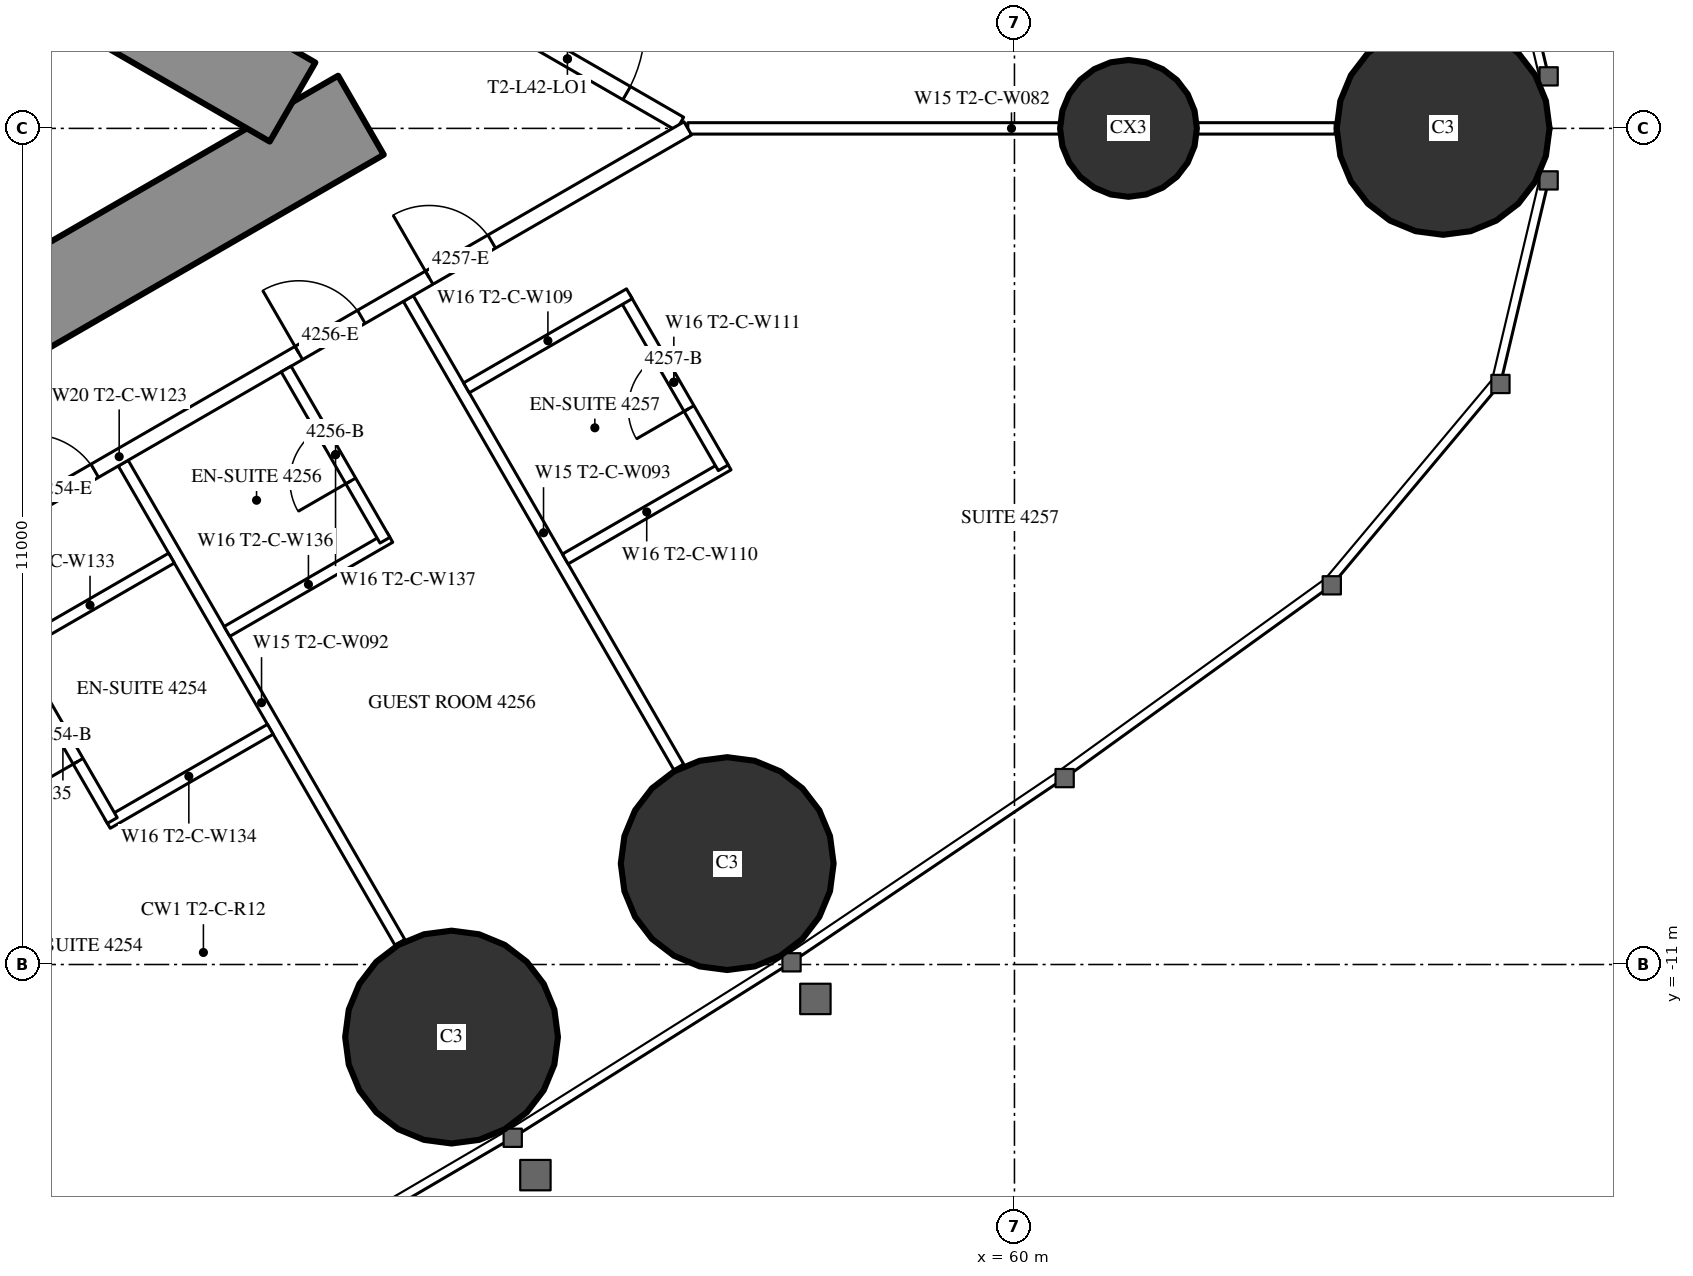
"""IFC4 building model, lengths in metres.
Left out: names, types, materials, properties, quantities, classifications, styles, units other than length and angle.
Written with IfcOpenShell. Run it as: python <this file> out.ifc"""

import sys

from ifc_helpers import new_model, si_unit, direction, frame, frame_2d, origin, origin_2d, place, context, subcontext, project, spatial, rectangle, circle, extrude, element, fill, save


model = new_model("IFC4")
c1 = context("Model", 3, precision=1e-05, world=origin(), true_north=direction((0.0, 1.0)))
c2 = subcontext(c1, "Body", "Model", "MODEL_VIEW")
j1 = project(units=[si_unit("LENGTHUNIT", "METRE"), si_unit("PLANEANGLEUNIT", "RADIAN")], contexts=[c1])
p1 = place(None, origin())
s1 = spatial("IfcSite", under=j1, at=p1, CompositionType="ELEMENT")
p2 = place(p1, origin())
s2 = spatial("IfcBuilding", under=s1, at=p2, CompositionType="ELEMENT")
p3 = place(p2, frame((0.0, 0.0, 159.8)))
s3 = spatial("IfcBuildingStorey", under=s2, at=p3, CompositionType="ELEMENT", Elevation=159.8)
for number, where, z_axis, x_axis in (
    (1, (65.64, 0.0, 0.0), (0.0, 0.0, 1.0), (1.0, 0.0, 0.0)),
    (2, (52.594, -11.955, 0.0), (0.0, 0.0, 1.0), (1.0, 0.0, 0.0)),
    (3, (56.221, -9.672, 0.0), (0.0, 0.0, 1.0), (1.0, 0.0, 0.0)),
):
    element("IfcColumn", number, at=place(p3, frame(where, z_axis=z_axis, x_axis=x_axis)), inside=s3, PredefinedType="COLUMN", context=c2, shape_type="SweptSolid", body=[
        extrude(circle(Radius=1.4, at=origin_2d()), origin(), (0.0, 0.0, 1.0), 3.5),
    ])
p4 = place(p3, frame((61.5, 0.0, 0.0), z_axis=(0.0, 0.0, 1.0), x_axis=(1.0, 0.0, 0.0)))
e4 = element("IfcColumn", 4, at=p4, inside=s3, PredefinedType="COLUMN", context=c2, shape_type="SweptSolid", body=[
    extrude(circle(Radius=0.9, at=origin_2d()), origin(), (0.0, 0.0, 1.0), 3.5),
])
p5 = place(p3, frame((27.2, -13.8, 0.0), z_axis=(0.0, 0.0, 1.0), x_axis=(0.866027159892, 0.499996958321, 0.0)))
e5 = element("IfcWall", 5, at=p5, inside=s3, PredefinedType="SHEAR", context=c2, shape_type="SweptSolid", body=[
    extrude(rectangle(XDim=27.947, YDim=1.2, at=frame_2d((13.973, 0.0))), origin(), (0.0, 0.0, 1.0), 3.5),
])
p6 = place(p5, frame((4.6, 0.0, 0.0)))
e6 = element("IfcOpeningElement", 6, at=p6, cuts=e5, PredefinedType="OPENING", context=c2, shape_type="SweptSolid", body=[
    extrude(rectangle(XDim=1.0, YDim=2.2, at=frame_2d((0.5, 1.1))), frame((0.0, 0.61, 0.0), z_axis=(0.0, -1.0, 0.0), x_axis=(1.0, 0.0, 0.0)), (0.0, 0.0, 1.0), 1.22),
])
p7 = place(p5, frame((13.395, 0.0, 0.0)))
e7 = element("IfcOpeningElement", 7, at=p7, cuts=e5, PredefinedType="OPENING", context=c2, shape_type="SweptSolid", body=[
    extrude(rectangle(XDim=1.8, YDim=2.2, at=frame_2d((0.9, 1.1))), frame((0.0, 0.61, 0.0), z_axis=(0.0, -1.0, 0.0), x_axis=(1.0, 0.0, 0.0)), (0.0, 0.0, 1.0), 1.22),
])
p8 = place(p3, frame((27.2, 13.8, 0.0), z_axis=(0.0, 0.0, 1.0), x_axis=(0.866024515034, -0.500001539357, 0.0)))
e8 = element("IfcWall", 8, at=p8, inside=s3, PredefinedType="SHEAR", context=c2, shape_type="SweptSolid", body=[
    extrude(rectangle(XDim=26.907, YDim=1.2, at=frame_2d((13.454, 0.0))), origin(), (0.0, 0.0, 1.0), 3.5),
])
p9 = place(p8, frame((4.6, 0.0, 0.0)))
e9 = element("IfcOpeningElement", 9, at=p9, cuts=e8, PredefinedType="OPENING", context=c2, shape_type="SweptSolid", body=[
    extrude(rectangle(XDim=1.0, YDim=2.2, at=frame_2d((0.5, 1.1))), frame((0.0, 0.61, 0.0), z_axis=(0.0, -1.0, 0.0), x_axis=(1.0, 0.0, 0.0)), (0.0, 0.0, 1.0), 1.22),
])
p10 = place(p8, frame((13.395, 0.0, 0.0)))
e10 = element("IfcOpeningElement", 10, at=p10, cuts=e8, PredefinedType="OPENING", context=c2, shape_type="SweptSolid", body=[
    extrude(rectangle(XDim=1.8, YDim=2.2, at=frame_2d((0.9, 1.1))), frame((0.0, 0.61, 0.0), z_axis=(0.0, -1.0, 0.0), x_axis=(1.0, 0.0, 0.0)), (0.0, 0.0, 1.0), 1.22),
])
p11 = place(p3, frame((48.275, -4.404, 0.0), z_axis=(0.0, 0.0, 1.0), x_axis=(0.500006004368, -0.866021937133, 0.0)))
e11 = element("IfcWall", 11, at=p11, inside=s3, PredefinedType="PARTITIONING", context=c2, shape_type="SweptSolid", body=[
    extrude(rectangle(XDim=7.279, YDim=0.15, at=frame_2d((3.64, 0.0))), origin(), (0.0, 0.0, 1.0), 2.3),
])
p12 = place(p3, frame((52.025, -2.238, 0.0), z_axis=(0.0, 0.0, 1.0), x_axis=(0.499983785035, -0.866034765296, 0.0)))
e12 = element("IfcWall", 12, at=p12, inside=s3, PredefinedType="PARTITIONING", context=c2, shape_type="SweptSolid", body=[
    extrude(rectangle(XDim=7.116, YDim=0.15, at=frame_2d((3.558, 0.0))), origin(), (0.0, 0.0, 1.0), 2.3),
])
p13 = place(p3, frame((55.702, 0.0, 0.0), z_axis=(0.0, 0.0, 1.0), x_axis=(1.0, 0.0, 0.0)))
e13 = element("IfcWall", 13, at=p13, inside=s3, PredefinedType="PARTITIONING", context=c2, shape_type="SweptSolid", body=[
    extrude(rectangle(XDim=8.518, YDim=0.15, at=frame_2d((4.259, 0.0))), origin(), (0.0, 0.0, 1.0), 2.3),
])
p14 = place(p3, frame((52.639, 1.769, 0.0), z_axis=(0.0, 0.0, 1.0), x_axis=(0.866027340901, -0.4999966448, 0.0)))
e14 = element("IfcWall", 14, at=p14, inside=s3, PredefinedType="PARTITIONING", context=c2, shape_type="SweptSolid", body=[
    extrude(rectangle(XDim=3.417, YDim=0.2, at=frame_2d((1.708, 0.0))), origin(), (0.0, 0.0, 1.0), 3.25),
])
p15 = place(p14, frame((0.809, 0.0, 0.0)))
e15 = element("IfcOpeningElement", 15, at=p15, cuts=e14, PredefinedType="OPENING", context=c2, shape_type="SweptSolid", body=[
    extrude(rectangle(XDim=1.8, YDim=2.2, at=frame_2d((0.9, 1.1))), frame((0.0, 0.11, 0.0), z_axis=(0.0, -1.0, 0.0), x_axis=(1.0, 0.0, 0.0)), (0.0, 0.0, 1.0), 0.22),
])
p16 = place(p3, frame((40.741, -8.638, 0.0), z_axis=(0.0, 0.0, 1.0), x_axis=(0.866022967338, 0.500004220025, 0.0)))
e16 = element("IfcWall", 16, at=p16, inside=s3, PredefinedType="PARTITIONING", context=c2, shape_type="SweptSolid", body=[
    extrude(rectangle(XDim=17.276, YDim=0.2, at=frame_2d((8.638, 0.0))), origin(), (0.0, 0.0, 1.0), 3.25),
])
p17 = place(p16, frame((7.316, 0.0, 0.0)))
e17 = element("IfcOpeningElement", 17, at=p17, cuts=e16, PredefinedType="OPENING", context=c2, shape_type="SweptSolid", body=[
    extrude(rectangle(XDim=0.95, YDim=2.2, at=frame_2d((0.475, 1.1))), frame((0.0, 0.11, 0.0), z_axis=(0.0, -1.0, 0.0), x_axis=(1.0, 0.0, 0.0)), (0.0, 0.0, 1.0), 0.22),
])
p18 = place(p16, frame((11.366, 0.0, 0.0)))
e18 = element("IfcOpeningElement", 18, at=p18, cuts=e16, PredefinedType="OPENING", context=c2, shape_type="SweptSolid", body=[
    extrude(rectangle(XDim=0.95, YDim=2.2, at=frame_2d((0.475, 1.1))), frame((0.0, 0.11, 0.0), z_axis=(0.0, -1.0, 0.0), x_axis=(1.0, 0.0, 0.0)), (0.0, 0.0, 1.0), 0.22),
])
p19 = place(p16, frame((13.347, 0.0, 0.0)))
e19 = element("IfcOpeningElement", 19, at=p19, cuts=e16, PredefinedType="OPENING", context=c2, shape_type="SweptSolid", body=[
    extrude(rectangle(XDim=0.95, YDim=2.2, at=frame_2d((0.475, 1.1))), frame((0.0, 0.11, 0.0), z_axis=(0.0, -1.0, 0.0), x_axis=(1.0, 0.0, 0.0)), (0.0, 0.0, 1.0), 0.22),
])
p20 = place(p3, frame((48.066, -9.143, 0.0), z_axis=(0.0, 0.0, 1.0), x_axis=(0.866006523861, 0.500032699561, 0.0)))
e20 = element("IfcWall", 20, at=p20, inside=s3, PredefinedType="PARTITIONING", context=c2, shape_type="SweptSolid", body=[
    extrude(rectangle(XDim=2.475, YDim=0.15, at=frame_2d((1.237, 0.0))), origin(), (0.0, 0.0, 1.0), 3.25),
])
p21 = place(p3, frame((46.831, -6.854, 0.0), z_axis=(0.0, 0.0, 1.0), x_axis=(0.500006934395, -0.866021400173, 0.0)))
e21 = element("IfcWall", 21, at=p21, inside=s3, PredefinedType="PARTITIONING", context=c2, shape_type="SweptSolid", body=[
    extrude(rectangle(XDim=2.6, YDim=0.15, at=frame_2d((1.3, 0.0))), origin(), (0.0, 0.0, 1.0), 3.25),
])
p22 = place(p21, frame((0.9, 0.0, 0.0)))
e22 = element("IfcOpeningElement", 22, at=p22, cuts=e21, PredefinedType="OPENING", context=c2, shape_type="SweptSolid", body=[
    extrude(rectangle(XDim=0.8, YDim=2.2, at=frame_2d((0.4, 1.1))), frame((0.0, 0.085, 0.0), z_axis=(0.0, -1.0, 0.0), x_axis=(1.0, 0.0, 0.0)), (0.0, 0.0, 1.0), 0.17),
])
for number, where, z_axis, x_axis in (
    (23, (46.766, -6.891, 0.0), (0.0, 0.0, 1.0), (0.866, 0.5, 0.0)),
    (24, (49.64, -6.618, 0.0), (0.0, 0.0, 1.0), (0.866, 0.5, 0.0)),
):
    element("IfcWall", number, at=place(p3, frame(where, z_axis=z_axis, x_axis=x_axis)), inside=s3, PredefinedType="PARTITIONING", context=c2, shape_type="SweptSolid", body=[
        extrude(rectangle(XDim=2.475, YDim=0.15, at=frame_2d((1.237, 0.0))), origin(), (0.0, 0.0, 1.0), 3.25),
    ])
p23 = place(p3, frame((50.418, -3.166, 0.0), z_axis=(0.0, 0.0, 1.0), x_axis=(0.499936506574, -0.866062058628, 0.0)))
e25 = element("IfcWall", 25, at=p23, inside=s3, PredefinedType="PARTITIONING", context=c2, shape_type="SweptSolid", body=[
    extrude(rectangle(XDim=2.6, YDim=0.15, at=frame_2d((1.3, 0.0))), origin(), (0.0, 0.0, 1.0), 3.25),
])
p24 = place(p23, frame((0.9, 0.0, 0.0)))
e26 = element("IfcOpeningElement", 26, at=p24, cuts=e25, PredefinedType="OPENING", context=c2, shape_type="SweptSolid", body=[
    extrude(rectangle(XDim=0.8, YDim=2.2, at=frame_2d((0.4, 1.1))), frame((0.0, 0.085, 0.0), z_axis=(0.0, -1.0, 0.0), x_axis=(1.0, 0.0, 0.0)), (0.0, 0.0, 1.0), 0.17),
])
p25 = place(p3, frame((54.09, -5.665, 0.0), z_axis=(0.0, 0.0, 1.0), x_axis=(0.866006523861, 0.500032699561, 0.0)))
e27 = element("IfcWall", 27, at=p25, inside=s3, PredefinedType="PARTITIONING", context=c2, shape_type="SweptSolid", body=[
    extrude(rectangle(XDim=2.475, YDim=0.15, at=frame_2d((1.237, 0.0))), origin(), (0.0, 0.0, 1.0), 3.25),
])
p26 = place(p3, frame((54.869, -2.213, 0.0), z_axis=(0.0, 0.0, 1.0), x_axis=(0.500047596559, -0.865997922154, 0.0)))
e28 = element("IfcWall", 28, at=p26, inside=s3, PredefinedType="PARTITIONING", context=c2, shape_type="SweptSolid", body=[
    extrude(rectangle(XDim=2.6, YDim=0.15, at=frame_2d((1.3, 0.0))), origin(), (0.0, 0.0, 1.0), 3.25),
])
p27 = place(p26, frame((0.9, 0.0, 0.0)))
e29 = element("IfcOpeningElement", 29, at=p27, cuts=e28, PredefinedType="OPENING", context=c2, shape_type="SweptSolid", body=[
    extrude(rectangle(XDim=0.8, YDim=2.2, at=frame_2d((0.4, 1.1))), frame((0.0, 0.085, 0.0), z_axis=(0.0, -1.0, 0.0), x_axis=(1.0, 0.0, 0.0)), (0.0, 0.0, 1.0), 0.17),
])
p28 = place(p3, frame((52.79, -3.413, 0.0), z_axis=(0.0, 0.0, 1.0), x_axis=(0.866006523861, 0.500032699561, 0.0)))
e30 = element("IfcWall", 30, at=p28, inside=s3, PredefinedType="PARTITIONING", context=c2, shape_type="SweptSolid", body=[
    extrude(rectangle(XDim=2.475, YDim=0.15, at=frame_2d((1.237, 0.0))), origin(), (0.0, 0.0, 1.0), 3.25),
])
p29 = place(p22, origin())
e31 = element("IfcDoor", 31, at=p29, inside=s3, OperationType="SINGLE_SWING_RIGHT", PredefinedType="DOOR", context=c2, shape_type="SweptSolid", body=[
    extrude(rectangle(XDim=0.8, YDim=2.2, at=frame_2d((0.4, 1.1))), frame((0.0, 0.025, 0.0), z_axis=(0.0, -1.0, 0.0), x_axis=(1.0, 0.0, 0.0)), (0.0, 0.0, 1.0), 0.05),
])
fill(e22, e31)
p30 = place(p17, origin())
e32 = element("IfcDoor", 32, at=p30, inside=s3, OperationType="SINGLE_SWING_LEFT", PredefinedType="DOOR", context=c2, shape_type="SweptSolid", body=[
    extrude(rectangle(XDim=0.95, YDim=2.2, at=frame_2d((0.475, 1.1))), frame((0.0, 0.025, 0.0), z_axis=(0.0, -1.0, 0.0), x_axis=(1.0, 0.0, 0.0)), (0.0, 0.0, 1.0), 0.05),
])
fill(e17, e32)
p31 = place(p24, origin())
e33 = element("IfcDoor", 33, at=p31, inside=s3, OperationType="SINGLE_SWING_RIGHT", PredefinedType="DOOR", context=c2, shape_type="SweptSolid", body=[
    extrude(rectangle(XDim=0.8, YDim=2.2, at=frame_2d((0.4, 1.1))), frame((0.0, 0.025, 0.0), z_axis=(0.0, -1.0, 0.0), x_axis=(1.0, 0.0, 0.0)), (0.0, 0.0, 1.0), 0.05),
])
fill(e26, e33)
p32 = place(p18, origin())
e34 = element("IfcDoor", 34, at=p32, inside=s3, OperationType="SINGLE_SWING_LEFT", PredefinedType="DOOR", context=c2, shape_type="SweptSolid", body=[
    extrude(rectangle(XDim=0.95, YDim=2.2, at=frame_2d((0.475, 1.1))), frame((0.0, 0.025, 0.0), z_axis=(0.0, -1.0, 0.0), x_axis=(1.0, 0.0, 0.0)), (0.0, 0.0, 1.0), 0.05),
])
fill(e18, e34)
p33 = place(p27, origin())
e35 = element("IfcDoor", 35, at=p33, inside=s3, OperationType="SINGLE_SWING_RIGHT", PredefinedType="DOOR", context=c2, shape_type="SweptSolid", body=[
    extrude(rectangle(XDim=0.8, YDim=2.2, at=frame_2d((0.4, 1.1))), frame((0.0, 0.025, 0.0), z_axis=(0.0, -1.0, 0.0), x_axis=(1.0, 0.0, 0.0)), (0.0, 0.0, 1.0), 0.05),
])
fill(e29, e35)
p34 = place(p19, origin())
e36 = element("IfcDoor", 36, at=p34, inside=s3, OperationType="SINGLE_SWING_LEFT", PredefinedType="DOOR", context=c2, shape_type="SweptSolid", body=[
    extrude(rectangle(XDim=0.95, YDim=2.2, at=frame_2d((0.475, 1.1))), frame((0.0, 0.025, 0.0), z_axis=(0.0, -1.0, 0.0), x_axis=(1.0, 0.0, 0.0)), (0.0, 0.0, 1.0), 0.05),
])
fill(e19, e36)
p35 = place(p15, origin())
e37 = element("IfcDoor", 37, at=p35, inside=s3, OperationType="DOUBLE_DOOR_SINGLE_SWING", PredefinedType="DOOR", context=c2, shape_type="SweptSolid", body=[
    extrude(rectangle(XDim=1.8, YDim=2.2, at=frame_2d((0.9, 1.1))), frame((0.0, 0.025, 0.0), z_axis=(0.0, -1.0, 0.0), x_axis=(1.0, 0.0, 0.0)), (0.0, 0.0, 1.0), 0.05),
])
fill(e15, e37)
save(model, sys.argv[1])
